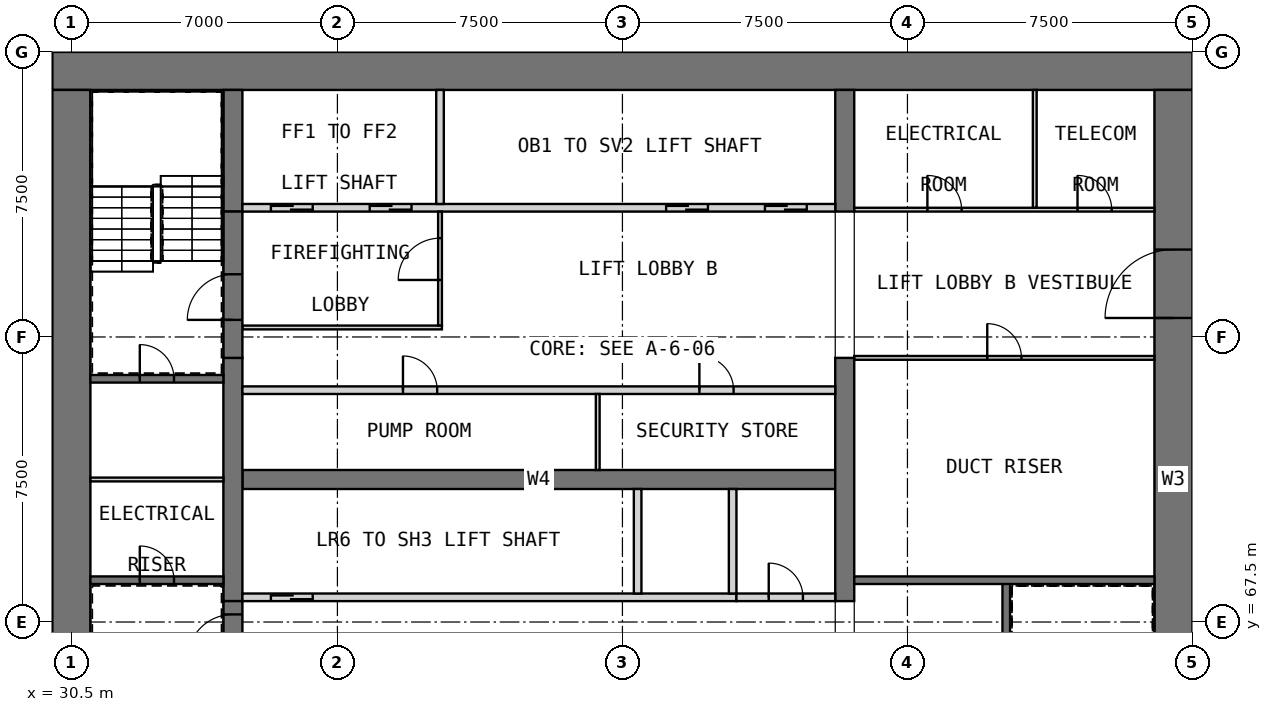
"""IFC4 building model, lengths in metres.
Left out: names, types, materials, properties, quantities, classifications, styles, units other than length and angle.
Written with IfcOpenShell. Run it as: python <this file> out.ifc"""

import sys

from ifc_helpers import new_model, si_unit, direction, frame, frame_2d, origin, place, context, subcontext, project, spatial, rectangle, extrude, element, fill, save


model = new_model("IFC4")
c1 = context("Model", 3, precision=1e-05, world=origin(), true_north=direction((0.0, 1.0)))
c2 = subcontext(c1, "Body", "Model", "MODEL_VIEW")
j1 = project(units=[si_unit("LENGTHUNIT", "METRE"), si_unit("PLANEANGLEUNIT", "RADIAN")], contexts=[c1])
p1 = place(None, origin())
s1 = spatial("IfcSite", under=j1, at=p1, CompositionType="ELEMENT")
p2 = place(p1, origin())
s2 = spatial("IfcBuilding", under=s1, at=p2, CompositionType="ELEMENT")
p3 = place(p2, frame((0.0, 0.0, 18.5)))
s3 = spatial("IfcBuildingStorey", under=s2, at=p3, CompositionType="ELEMENT", Elevation=18.5)
p4 = place(p3, frame((30.0, 82.0, 0.0), z_axis=(0.0, 0.0, 1.0), x_axis=(1.0, 0.0, 0.0)))
e1 = element("IfcWall", 1, at=p4, inside=s3, PredefinedType="SHEAR", context=c2, shape_type="SweptSolid", body=[
    extrude(rectangle(XDim=30.0, YDim=1.0, at=frame_2d((15.0, 0.0))), origin(), (0.0, 0.0, 1.0), 5.0),
])
p5 = place(p3, frame((30.5, 61.0, 0.0), z_axis=(0.0, 0.0, 1.0), x_axis=(0.0, 1.0, 0.0)))
e2 = element("IfcWall", 2, at=p5, inside=s3, PredefinedType="SHEAR", context=c2, shape_type="SweptSolid", body=[
    extrude(rectangle(XDim=20.5, YDim=1.0, at=frame_2d((10.25, 0.0))), origin(), (0.0, 0.0, 1.0), 5.0),
])
p6 = place(p3, frame((59.5, 61.0, 0.0), z_axis=(0.0, 0.0, 1.0), x_axis=(0.0, 1.0, 0.0)))
e3 = element("IfcWall", 3, at=p6, inside=s3, PredefinedType="SHEAR", context=c2, shape_type="SweptSolid", body=[
    extrude(rectangle(XDim=20.5, YDim=1.0, at=frame_2d((10.25, 0.0))), origin(), (0.0, 0.0, 1.0), 5.0),
])
p7 = place(p6, frame((14.5, 0.0, 0.0)))
e4 = element("IfcOpeningElement", 4, at=p7, cuts=e3, PredefinedType="OPENING", context=c2, shape_type="SweptSolid", body=[
    extrude(rectangle(XDim=1.8, YDim=2.1, at=frame_2d((0.9, 1.05))), frame((0.0, 0.51, 0.0), z_axis=(0.0, -1.0, 0.0), x_axis=(1.0, 0.0, 0.0)), (0.0, 0.0, 1.0), 1.02),
])
p8 = place(p3, frame((35.0, 71.25, 0.0), z_axis=(0.0, 0.0, 1.0), x_axis=(1.0, 0.0, 0.0)))
e5 = element("IfcWall", 5, at=p8, inside=s3, PredefinedType="SHEAR", context=c2, shape_type="SweptSolid", body=[
    extrude(rectangle(XDim=15.6, YDim=0.5, at=frame_2d((7.8, 0.0))), origin(), (0.0, 0.0, 1.0), 5.0),
])
p9 = place(p3, frame((34.75, 68.05, 0.0), z_axis=(0.0, 0.0, 1.0), x_axis=(0.0, 1.0, 0.0)))
e6 = element("IfcWall", 6, at=p9, inside=s3, PredefinedType="SHEAR", context=c2, shape_type="SweptSolid", body=[
    extrude(rectangle(XDim=6.4, YDim=0.5, at=frame_2d((3.2, 0.0))), origin(), (0.0, 0.0, 1.0), 5.0),
])
p10 = place(p3, frame((34.75, 78.3, 0.0), z_axis=(0.0, 0.0, 1.0), x_axis=(0.0, 1.0, 0.0)))
e7 = element("IfcWall", 7, at=p10, inside=s3, PredefinedType="SHEAR", context=c2, shape_type="SweptSolid", body=[
    extrude(rectangle(XDim=3.2, YDim=0.5, at=frame_2d((1.6, 0.0))), origin(), (0.0, 0.0, 1.0), 5.0),
])
p11 = place(p3, frame((50.85, 68.05, 0.0), z_axis=(0.0, 0.0, 1.0), x_axis=(0.0, 1.0, 0.0)))
e8 = element("IfcWall", 8, at=p11, inside=s3, PredefinedType="SHEAR", context=c2, shape_type="SweptSolid", body=[
    extrude(rectangle(XDim=6.4, YDim=0.5, at=frame_2d((3.2, 0.0))), origin(), (0.0, 0.0, 1.0), 5.0),
])
p12 = place(p3, frame((50.85, 78.3, 0.0), z_axis=(0.0, 0.0, 1.0), x_axis=(0.0, 1.0, 0.0)))
e9 = element("IfcWall", 9, at=p12, inside=s3, PredefinedType="SHEAR", context=c2, shape_type="SweptSolid", body=[
    extrude(rectangle(XDim=3.2, YDim=0.5, at=frame_2d((1.6, 0.0))), origin(), (0.0, 0.0, 1.0), 5.0),
])
p13 = place(p3, frame((35.0, 68.15, 0.0), z_axis=(0.0, 0.0, 1.0), x_axis=(1.0, 0.0, 0.0)))
e10 = element("IfcWall", 10, at=p13, inside=s3, PredefinedType="SOLIDWALL", context=c2, shape_type="SweptSolid", body=[
    extrude(rectangle(XDim=13.0, YDim=0.2, at=frame_2d((6.5, 0.0))), origin(), (0.0, 0.0, 1.0), 5.0),
])
p14 = place(p13, frame((0.75, 0.0, 0.0)))
e11 = element("IfcOpeningElement", 11, at=p14, cuts=e10, PredefinedType="OPENING", context=c2, shape_type="SweptSolid", body=[
    extrude(rectangle(XDim=1.1, YDim=2.1, at=frame_2d((0.55, 1.05))), frame((0.0, 0.11, 0.0), z_axis=(0.0, -1.0, 0.0), x_axis=(1.0, 0.0, 0.0)), (0.0, 0.0, 1.0), 0.22),
])
for number, where, z_axis, x_axis in (
    (12, (45.4, 68.25, 0.0), (0.0, 0.0, 1.0), (0.0, 1.0, 0.0)),
    (13, (47.9, 68.25, 0.0), (0.0, 0.0, 1.0), (0.0, 1.0, 0.0)),
):
    element("IfcWall", number, at=place(p3, frame(where, z_axis=z_axis, x_axis=x_axis)), inside=s3, PredefinedType="SOLIDWALL", context=c2, shape_type="SweptSolid", body=[
        extrude(rectangle(XDim=2.75, YDim=0.2, at=frame_2d((1.375, 0.0))), origin(), (0.0, 0.0, 1.0), 5.0),
    ])
p15 = place(p3, frame((48.0, 68.15, 0.0), z_axis=(0.0, 0.0, 1.0), x_axis=(1.0, 0.0, 0.0)))
e14 = element("IfcWall", 14, at=p15, inside=s3, PredefinedType="PARTITIONING", context=c2, shape_type="SweptSolid", body=[
    extrude(rectangle(XDim=2.6, YDim=0.2, at=frame_2d((1.3, 0.0))), origin(), (0.0, 0.0, 1.0), 4.7),
])
p16 = place(p15, frame((0.85, 0.0, 0.0)))
e15 = element("IfcOpeningElement", 15, at=p16, cuts=e14, PredefinedType="OPENING", context=c2, shape_type="SweptSolid", body=[
    extrude(rectangle(XDim=0.9, YDim=2.1, at=frame_2d((0.45, 1.05))), frame((0.0, 0.11, 0.0), z_axis=(0.0, -1.0, 0.0), x_axis=(1.0, 0.0, 0.0)), (0.0, 0.0, 1.0), 0.22),
])
p17 = place(p3, frame((35.0, 73.6, 0.0), z_axis=(0.0, 0.0, 1.0), x_axis=(1.0, 0.0, 0.0)))
e16 = element("IfcWall", 16, at=p17, inside=s3, PredefinedType="PARTITIONING", context=c2, shape_type="SweptSolid", body=[
    extrude(rectangle(XDim=15.6, YDim=0.2, at=frame_2d((7.8, 0.0))), origin(), (0.0, 0.0, 1.0), 4.7),
])
p18 = place(p17, frame((4.225, 0.0, 0.0)))
e17 = element("IfcOpeningElement", 17, at=p18, cuts=e16, PredefinedType="OPENING", context=c2, shape_type="SweptSolid", body=[
    extrude(rectangle(XDim=0.9, YDim=2.1, at=frame_2d((0.45, 1.05))), frame((0.0, 0.11, 0.0), z_axis=(0.0, -1.0, 0.0), x_axis=(1.0, 0.0, 0.0)), (0.0, 0.0, 1.0), 0.22),
])
p19 = place(p17, frame((12.025, 0.0, 0.0)))
e18 = element("IfcOpeningElement", 18, at=p19, cuts=e16, PredefinedType="OPENING", context=c2, shape_type="SweptSolid", body=[
    extrude(rectangle(XDim=0.9, YDim=2.1, at=frame_2d((0.45, 1.05))), frame((0.0, 0.11, 0.0), z_axis=(0.0, -1.0, 0.0), x_axis=(1.0, 0.0, 0.0)), (0.0, 0.0, 1.0), 0.22),
])
p20 = place(p3, frame((44.35, 71.5, 0.0), z_axis=(0.0, 0.0, 1.0), x_axis=(0.0, 1.0, 0.0)))
e19 = element("IfcWall", 19, at=p20, inside=s3, PredefinedType="PARTITIONING", context=c2, shape_type="SweptSolid", body=[
    extrude(rectangle(XDim=2.0, YDim=0.1, at=frame_2d((1.0, 0.0))), origin(), (0.0, 0.0, 1.0), 4.7),
])
p21 = place(p3, frame((35.0, 78.4, 0.0), z_axis=(0.0, 0.0, 1.0), x_axis=(1.0, 0.0, 0.0)))
e20 = element("IfcWall", 20, at=p21, inside=s3, PredefinedType="SOLIDWALL", context=c2, shape_type="SweptSolid", body=[
    extrude(rectangle(XDim=15.6, YDim=0.2, at=frame_2d((7.8, 0.0))), origin(), (0.0, 0.0, 1.0), 5.0),
])
p22 = place(p21, frame((0.75, 0.0, 0.0)))
e21 = element("IfcOpeningElement", 21, at=p22, cuts=e20, PredefinedType="OPENING", context=c2, shape_type="SweptSolid", body=[
    extrude(rectangle(XDim=1.1, YDim=2.1, at=frame_2d((0.55, 1.05))), frame((0.0, 0.11, 0.0), z_axis=(0.0, -1.0, 0.0), x_axis=(1.0, 0.0, 0.0)), (0.0, 0.0, 1.0), 0.22),
])
p23 = place(p21, frame((3.35, 0.0, 0.0)))
e22 = element("IfcOpeningElement", 22, at=p23, cuts=e20, PredefinedType="OPENING", context=c2, shape_type="SweptSolid", body=[
    extrude(rectangle(XDim=1.1, YDim=2.1, at=frame_2d((0.55, 1.05))), frame((0.0, 0.11, 0.0), z_axis=(0.0, -1.0, 0.0), x_axis=(1.0, 0.0, 0.0)), (0.0, 0.0, 1.0), 0.22),
])
p24 = place(p21, frame((11.15, 0.0, 0.0)))
e23 = element("IfcOpeningElement", 23, at=p24, cuts=e20, PredefinedType="OPENING", context=c2, shape_type="SweptSolid", body=[
    extrude(rectangle(XDim=1.1, YDim=2.1, at=frame_2d((0.55, 1.05))), frame((0.0, 0.11, 0.0), z_axis=(0.0, -1.0, 0.0), x_axis=(1.0, 0.0, 0.0)), (0.0, 0.0, 1.0), 0.22),
])
p25 = place(p21, frame((13.75, 0.0, 0.0)))
e24 = element("IfcOpeningElement", 24, at=p25, cuts=e20, PredefinedType="OPENING", context=c2, shape_type="SweptSolid", body=[
    extrude(rectangle(XDim=1.1, YDim=2.1, at=frame_2d((0.55, 1.05))), frame((0.0, 0.11, 0.0), z_axis=(0.0, -1.0, 0.0), x_axis=(1.0, 0.0, 0.0)), (0.0, 0.0, 1.0), 0.22),
])
p26 = place(p3, frame((40.2, 78.5, 0.0), z_axis=(0.0, 0.0, 1.0), x_axis=(0.0, 1.0, 0.0)))
e25 = element("IfcWall", 25, at=p26, inside=s3, PredefinedType="SOLIDWALL", context=c2, shape_type="SweptSolid", body=[
    extrude(rectangle(XDim=3.0, YDim=0.2, at=frame_2d((1.5, 0.0))), origin(), (0.0, 0.0, 1.0), 5.0),
])
p27 = place(p3, frame((35.0, 75.25, 0.0), z_axis=(0.0, 0.0, 1.0), x_axis=(1.0, 0.0, 0.0)))
e26 = element("IfcWall", 26, at=p27, inside=s3, PredefinedType="PARTITIONING", context=c2, shape_type="SweptSolid", body=[
    extrude(rectangle(XDim=5.25, YDim=0.1, at=frame_2d((2.625, 0.0))), origin(), (0.0, 0.0, 1.0), 4.7),
])
p28 = place(p3, frame((40.2, 75.3, 0.0), z_axis=(0.0, 0.0, 1.0), x_axis=(0.0, 1.0, 0.0)))
e27 = element("IfcWall", 27, at=p28, inside=s3, PredefinedType="PARTITIONING", context=c2, shape_type="SweptSolid", body=[
    extrude(rectangle(XDim=3.0, YDim=0.1, at=frame_2d((1.5, 0.0))), origin(), (0.0, 0.0, 1.0), 4.7),
])
p29 = place(p28, frame((1.2, 0.0, 0.0)))
e28 = element("IfcOpeningElement", 28, at=p29, cuts=e27, PredefinedType="OPENING", context=c2, shape_type="SweptSolid", body=[
    extrude(rectangle(XDim=1.1, YDim=2.1, at=frame_2d((0.55, 1.05))), frame((0.0, 0.06, 0.0), z_axis=(0.0, -1.0, 0.0), x_axis=(1.0, 0.0, 0.0)), (0.0, 0.0, 1.0), 0.12),
])
p30 = place(p3, frame((34.75, 64.2, 0.0), z_axis=(0.0, 0.0, 1.0), x_axis=(0.0, 1.0, 0.0)))
e29 = element("IfcWall", 29, at=p30, inside=s3, PredefinedType="SOLIDWALL", context=c2, shape_type="SweptSolid", body=[
    extrude(rectangle(XDim=3.85, YDim=0.5, at=frame_2d((1.925, 0.0))), origin(), (0.0, 0.0, 1.0), 3.8),
])
p31 = place(p30, frame((2.3, 0.0, 0.0)))
e30 = element("IfcOpeningElement", 30, at=p31, cuts=e29, PredefinedType="OPENING", context=c2, shape_type="SweptSolid", body=[
    extrude(rectangle(XDim=1.2, YDim=2.1, at=frame_2d((0.6, 1.05))), frame((0.0, 0.26, 0.0), z_axis=(0.0, -1.0, 0.0), x_axis=(1.0, 0.0, 0.0)), (0.0, 0.0, 1.0), 0.52),
])
p32 = place(p3, frame((34.75, 74.45, 0.0), z_axis=(0.0, 0.0, 1.0), x_axis=(0.0, 1.0, 0.0)))
e31 = element("IfcWall", 31, at=p32, inside=s3, PredefinedType="SOLIDWALL", context=c2, shape_type="SweptSolid", body=[
    extrude(rectangle(XDim=3.85, YDim=0.5, at=frame_2d((1.925, 0.0))), origin(), (0.0, 0.0, 1.0), 3.8),
])
p33 = place(p32, frame((1.0, 0.0, 0.0)))
e32 = element("IfcOpeningElement", 32, at=p33, cuts=e31, PredefinedType="OPENING", context=c2, shape_type="SweptSolid", body=[
    extrude(rectangle(XDim=1.2, YDim=2.1, at=frame_2d((0.6, 1.05))), frame((0.0, 0.26, 0.0), z_axis=(0.0, -1.0, 0.0), x_axis=(1.0, 0.0, 0.0)), (0.0, 0.0, 1.0), 0.52),
])
p34 = place(p3, frame((31.0, 68.6, 0.0), z_axis=(0.0, 0.0, 1.0), x_axis=(1.0, 0.0, 0.0)))
e33 = element("IfcWall", 33, at=p34, inside=s3, PredefinedType="SOLIDWALL", context=c2, shape_type="SweptSolid", body=[
    extrude(rectangle(XDim=3.5, YDim=0.2, at=frame_2d((1.75, 0.0))), origin(), (0.0, 0.0, 1.0), 4.7),
])
p35 = place(p34, frame((1.3, 0.0, 0.0)))
e34 = element("IfcOpeningElement", 34, at=p35, cuts=e33, PredefinedType="OPENING", context=c2, shape_type="SweptSolid", body=[
    extrude(rectangle(XDim=0.9, YDim=2.1, at=frame_2d((0.45, 1.05))), frame((0.0, 0.11, 0.0), z_axis=(0.0, -1.0, 0.0), x_axis=(1.0, 0.0, 0.0)), (0.0, 0.0, 1.0), 0.22),
])
p36 = place(p3, frame((31.0, 73.9, 0.0), z_axis=(0.0, 0.0, 1.0), x_axis=(1.0, 0.0, 0.0)))
e35 = element("IfcWall", 35, at=p36, inside=s3, PredefinedType="SOLIDWALL", context=c2, shape_type="SweptSolid", body=[
    extrude(rectangle(XDim=3.5, YDim=0.2, at=frame_2d((1.75, 0.0))), origin(), (0.0, 0.0, 1.0), 4.7),
])
p37 = place(p36, frame((1.3, 0.0, 0.0)))
e36 = element("IfcOpeningElement", 36, at=p37, cuts=e35, PredefinedType="OPENING", context=c2, shape_type="SweptSolid", body=[
    extrude(rectangle(XDim=0.9, YDim=2.1, at=frame_2d((0.45, 1.05))), frame((0.0, 0.11, 0.0), z_axis=(0.0, -1.0, 0.0), x_axis=(1.0, 0.0, 0.0)), (0.0, 0.0, 1.0), 0.22),
])
p38 = place(p3, frame((55.1, 61.0, 0.0), z_axis=(0.0, 0.0, 1.0), x_axis=(0.0, 1.0, 0.0)))
e37 = element("IfcWall", 37, at=p38, inside=s3, PredefinedType="SOLIDWALL", context=c2, shape_type="SweptSolid", body=[
    extrude(rectangle(XDim=7.6, YDim=0.2, at=frame_2d((3.8, 0.0))), origin(), (0.0, 0.0, 1.0), 4.7),
])
p39 = place(p3, frame((51.1, 68.6, 0.0), z_axis=(0.0, 0.0, 1.0), x_axis=(1.0, 0.0, 0.0)))
e38 = element("IfcWall", 38, at=p39, inside=s3, PredefinedType="SOLIDWALL", context=c2, shape_type="SweptSolid", body=[
    extrude(rectangle(XDim=7.9, YDim=0.2, at=frame_2d((3.95, 0.0))), origin(), (0.0, 0.0, 1.0), 4.7),
])
p40 = place(p3, frame((31.0, 71.25, 0.0), z_axis=(0.0, 0.0, 1.0), x_axis=(1.0, 0.0, 0.0)))
e39 = element("IfcWall", 39, at=p40, inside=s3, PredefinedType="PARTITIONING", context=c2, shape_type="SweptSolid", body=[
    extrude(rectangle(XDim=3.5, YDim=0.1, at=frame_2d((1.75, 0.0))), origin(), (0.0, 0.0, 1.0), 4.7),
])
p41 = place(p3, frame((51.1, 74.45, 0.0), z_axis=(0.0, 0.0, 1.0), x_axis=(1.0, 0.0, 0.0)))
e40 = element("IfcWall", 40, at=p41, inside=s3, PredefinedType="PARTITIONING", context=c2, shape_type="SweptSolid", body=[
    extrude(rectangle(XDim=7.9, YDim=0.1, at=frame_2d((3.95, 0.0))), origin(), (0.0, 0.0, 1.0), 4.7),
])
p42 = place(p41, frame((3.5, 0.0, 0.0)))
e41 = element("IfcOpeningElement", 41, at=p42, cuts=e40, PredefinedType="OPENING", context=c2, shape_type="SweptSolid", body=[
    extrude(rectangle(XDim=0.9, YDim=2.1, at=frame_2d((0.45, 1.05))), frame((0.0, 0.06, 0.0), z_axis=(0.0, -1.0, 0.0), x_axis=(1.0, 0.0, 0.0)), (0.0, 0.0, 1.0), 0.12),
])
p43 = place(p3, frame((51.1, 78.35, 0.0), z_axis=(0.0, 0.0, 1.0), x_axis=(1.0, 0.0, 0.0)))
e42 = element("IfcWall", 42, at=p43, inside=s3, PredefinedType="PARTITIONING", context=c2, shape_type="SweptSolid", body=[
    extrude(rectangle(XDim=7.9, YDim=0.1, at=frame_2d((3.95, 0.0))), origin(), (0.0, 0.0, 1.0), 4.7),
])
p44 = place(p43, frame((1.925, 0.0, 0.0)))
e43 = element("IfcOpeningElement", 43, at=p44, cuts=e42, PredefinedType="OPENING", context=c2, shape_type="SweptSolid", body=[
    extrude(rectangle(XDim=0.9, YDim=2.1, at=frame_2d((0.45, 1.05))), frame((0.0, 0.06, 0.0), z_axis=(0.0, -1.0, 0.0), x_axis=(1.0, 0.0, 0.0)), (0.0, 0.0, 1.0), 0.12),
])
p45 = place(p43, frame((5.875, 0.0, 0.0)))
e44 = element("IfcOpeningElement", 44, at=p45, cuts=e42, PredefinedType="OPENING", context=c2, shape_type="SweptSolid", body=[
    extrude(rectangle(XDim=0.9, YDim=2.1, at=frame_2d((0.45, 1.05))), frame((0.0, 0.06, 0.0), z_axis=(0.0, -1.0, 0.0), x_axis=(1.0, 0.0, 0.0)), (0.0, 0.0, 1.0), 0.12),
])
p46 = place(p3, frame((55.85, 78.4, 0.0), z_axis=(0.0, 0.0, 1.0), x_axis=(0.0, 1.0, 0.0)))
e45 = element("IfcWall", 45, at=p46, inside=s3, PredefinedType="PARTITIONING", context=c2, shape_type="SweptSolid", body=[
    extrude(rectangle(XDim=3.1, YDim=0.1, at=frame_2d((1.55, 0.0))), origin(), (0.0, 0.0, 1.0), 4.7),
])
p47 = place(p14, origin())
e46 = element("IfcDoor", 46, at=p47, inside=s3, OperationType="DOUBLE_DOOR_SLIDING", PredefinedType="DOOR", context=c2, shape_type="SweptSolid", body=[
    extrude(rectangle(XDim=1.1, YDim=2.1, at=frame_2d((0.55, 1.05))), frame((0.0, 0.025, 0.0), z_axis=(0.0, -1.0, 0.0), x_axis=(1.0, 0.0, 0.0)), (0.0, 0.0, 1.0), 0.05),
])
fill(e11, e46)
p48 = place(p16, origin())
e47 = element("IfcDoor", 47, at=p48, inside=s3, OperationType="SINGLE_SWING_LEFT", PredefinedType="DOOR", context=c2, shape_type="SweptSolid", body=[
    extrude(rectangle(XDim=0.9, YDim=2.1, at=frame_2d((0.45, 1.05))), frame((0.0, 0.025, 0.0), z_axis=(0.0, -1.0, 0.0), x_axis=(1.0, 0.0, 0.0)), (0.0, 0.0, 1.0), 0.05),
])
fill(e15, e47)
p49 = place(p18, origin())
e48 = element("IfcDoor", 48, at=p49, inside=s3, OperationType="SINGLE_SWING_LEFT", PredefinedType="DOOR", context=c2, shape_type="SweptSolid", body=[
    extrude(rectangle(XDim=0.9, YDim=2.1, at=frame_2d((0.45, 1.05))), frame((0.0, 0.025, 0.0), z_axis=(0.0, -1.0, 0.0), x_axis=(1.0, 0.0, 0.0)), (0.0, 0.0, 1.0), 0.05),
])
fill(e17, e48)
p50 = place(p19, origin())
e49 = element("IfcDoor", 49, at=p50, inside=s3, OperationType="SINGLE_SWING_RIGHT", PredefinedType="DOOR", context=c2, shape_type="SweptSolid", body=[
    extrude(rectangle(XDim=0.9, YDim=2.1, at=frame_2d((0.45, 1.05))), frame((0.0, 0.025, 0.0), z_axis=(0.0, -1.0, 0.0), x_axis=(1.0, 0.0, 0.0)), (0.0, 0.0, 1.0), 0.05),
])
fill(e18, e49)
p51 = place(p22, origin())
e50 = element("IfcDoor", 50, at=p51, inside=s3, OperationType="DOUBLE_DOOR_SLIDING", PredefinedType="DOOR", context=c2, shape_type="SweptSolid", body=[
    extrude(rectangle(XDim=1.1, YDim=2.1, at=frame_2d((0.55, 1.05))), frame((0.0, 0.025, 0.0), z_axis=(0.0, -1.0, 0.0), x_axis=(1.0, 0.0, 0.0)), (0.0, 0.0, 1.0), 0.05),
])
fill(e21, e50)
p52 = place(p23, origin())
e51 = element("IfcDoor", 51, at=p52, inside=s3, OperationType="DOUBLE_DOOR_SLIDING", PredefinedType="DOOR", context=c2, shape_type="SweptSolid", body=[
    extrude(rectangle(XDim=1.1, YDim=2.1, at=frame_2d((0.55, 1.05))), frame((0.0, 0.025, 0.0), z_axis=(0.0, -1.0, 0.0), x_axis=(1.0, 0.0, 0.0)), (0.0, 0.0, 1.0), 0.05),
])
fill(e22, e51)
p53 = place(p24, origin())
e52 = element("IfcDoor", 52, at=p53, inside=s3, OperationType="DOUBLE_DOOR_SLIDING", PredefinedType="DOOR", context=c2, shape_type="SweptSolid", body=[
    extrude(rectangle(XDim=1.1, YDim=2.1, at=frame_2d((0.55, 1.05))), frame((0.0, 0.025, 0.0), z_axis=(0.0, -1.0, 0.0), x_axis=(1.0, 0.0, 0.0)), (0.0, 0.0, 1.0), 0.05),
])
fill(e23, e52)
p54 = place(p25, origin())
e53 = element("IfcDoor", 53, at=p54, inside=s3, OperationType="DOUBLE_DOOR_SLIDING", PredefinedType="DOOR", context=c2, shape_type="SweptSolid", body=[
    extrude(rectangle(XDim=1.1, YDim=2.1, at=frame_2d((0.55, 1.05))), frame((0.0, 0.025, 0.0), z_axis=(0.0, -1.0, 0.0), x_axis=(1.0, 0.0, 0.0)), (0.0, 0.0, 1.0), 0.05),
])
fill(e24, e53)
p55 = place(p7, origin())
e54 = element("IfcDoor", 54, at=p55, inside=s3, OperationType="DOUBLE_DOOR_SINGLE_SWING", PredefinedType="DOOR", context=c2, shape_type="SweptSolid", body=[
    extrude(rectangle(XDim=1.8, YDim=2.1, at=frame_2d((0.9, 1.05))), frame((0.0, 0.025, 0.0), z_axis=(0.0, -1.0, 0.0), x_axis=(1.0, 0.0, 0.0)), (0.0, 0.0, 1.0), 0.05),
])
fill(e4, e54)
p56 = place(p29, origin())
e55 = element("IfcDoor", 55, at=p56, inside=s3, OperationType="SINGLE_SWING_LEFT", PredefinedType="DOOR", context=c2, shape_type="SweptSolid", body=[
    extrude(rectangle(XDim=1.1, YDim=2.1, at=frame_2d((0.55, 1.05))), frame((0.0, 0.025, 0.0), z_axis=(0.0, -1.0, 0.0), x_axis=(1.0, 0.0, 0.0)), (0.0, 0.0, 1.0), 0.05),
])
fill(e28, e55)
p57 = place(p31, origin())
e56 = element("IfcDoor", 56, at=p57, inside=s3, OperationType="SINGLE_SWING_LEFT", PredefinedType="DOOR", context=c2, shape_type="SweptSolid", body=[
    extrude(rectangle(XDim=1.2, YDim=2.1, at=frame_2d((0.6, 1.05))), frame((0.0, 0.025, 0.0), z_axis=(0.0, -1.0, 0.0), x_axis=(1.0, 0.0, 0.0)), (0.0, 0.0, 1.0), 0.05),
])
fill(e30, e56)
p58 = place(p33, origin())
e57 = element("IfcDoor", 57, at=p58, inside=s3, OperationType="SINGLE_SWING_RIGHT", PredefinedType="DOOR", context=c2, shape_type="SweptSolid", body=[
    extrude(rectangle(XDim=1.2, YDim=2.1, at=frame_2d((0.6, 1.05))), frame((0.0, 0.025, 0.0), z_axis=(0.0, -1.0, 0.0), x_axis=(1.0, 0.0, 0.0)), (0.0, 0.0, 1.0), 0.05),
])
fill(e32, e57)
p59 = place(p35, origin())
e58 = element("IfcDoor", 58, at=p59, inside=s3, OperationType="SINGLE_SWING_LEFT", PredefinedType="DOOR", context=c2, shape_type="SweptSolid", body=[
    extrude(rectangle(XDim=0.9, YDim=2.1, at=frame_2d((0.45, 1.05))), frame((0.0, 0.025, 0.0), z_axis=(0.0, -1.0, 0.0), x_axis=(1.0, 0.0, 0.0)), (0.0, 0.0, 1.0), 0.05),
])
fill(e34, e58)
p60 = place(p37, origin())
e59 = element("IfcDoor", 59, at=p60, inside=s3, OperationType="SINGLE_SWING_RIGHT", PredefinedType="DOOR", context=c2, shape_type="SweptSolid", body=[
    extrude(rectangle(XDim=0.9, YDim=2.1, at=frame_2d((0.45, 1.05))), frame((0.0, 0.025, 0.0), z_axis=(0.0, -1.0, 0.0), x_axis=(1.0, 0.0, 0.0)), (0.0, 0.0, 1.0), 0.05),
])
fill(e36, e59)
p61 = place(p42, origin())
e60 = element("IfcDoor", 60, at=p61, inside=s3, OperationType="SINGLE_SWING_LEFT", PredefinedType="DOOR", context=c2, shape_type="SweptSolid", body=[
    extrude(rectangle(XDim=0.9, YDim=2.1, at=frame_2d((0.45, 1.05))), frame((0.0, 0.025, 0.0), z_axis=(0.0, -1.0, 0.0), x_axis=(1.0, 0.0, 0.0)), (0.0, 0.0, 1.0), 0.05),
])
fill(e41, e60)
p62 = place(p44, origin())
e61 = element("IfcDoor", 61, at=p62, inside=s3, OperationType="SINGLE_SWING_LEFT", PredefinedType="DOOR", context=c2, shape_type="SweptSolid", body=[
    extrude(rectangle(XDim=0.9, YDim=2.1, at=frame_2d((0.45, 1.05))), frame((0.0, 0.025, 0.0), z_axis=(0.0, -1.0, 0.0), x_axis=(1.0, 0.0, 0.0)), (0.0, 0.0, 1.0), 0.05),
])
fill(e43, e61)
p63 = place(p45, origin())
e62 = element("IfcDoor", 62, at=p63, inside=s3, OperationType="SINGLE_SWING_RIGHT", PredefinedType="DOOR", context=c2, shape_type="SweptSolid", body=[
    extrude(rectangle(XDim=0.9, YDim=2.1, at=frame_2d((0.45, 1.05))), frame((0.0, 0.025, 0.0), z_axis=(0.0, -1.0, 0.0), x_axis=(1.0, 0.0, 0.0)), (0.0, 0.0, 1.0), 0.05),
])
fill(e44, e62)
save(model, sys.argv[1])
